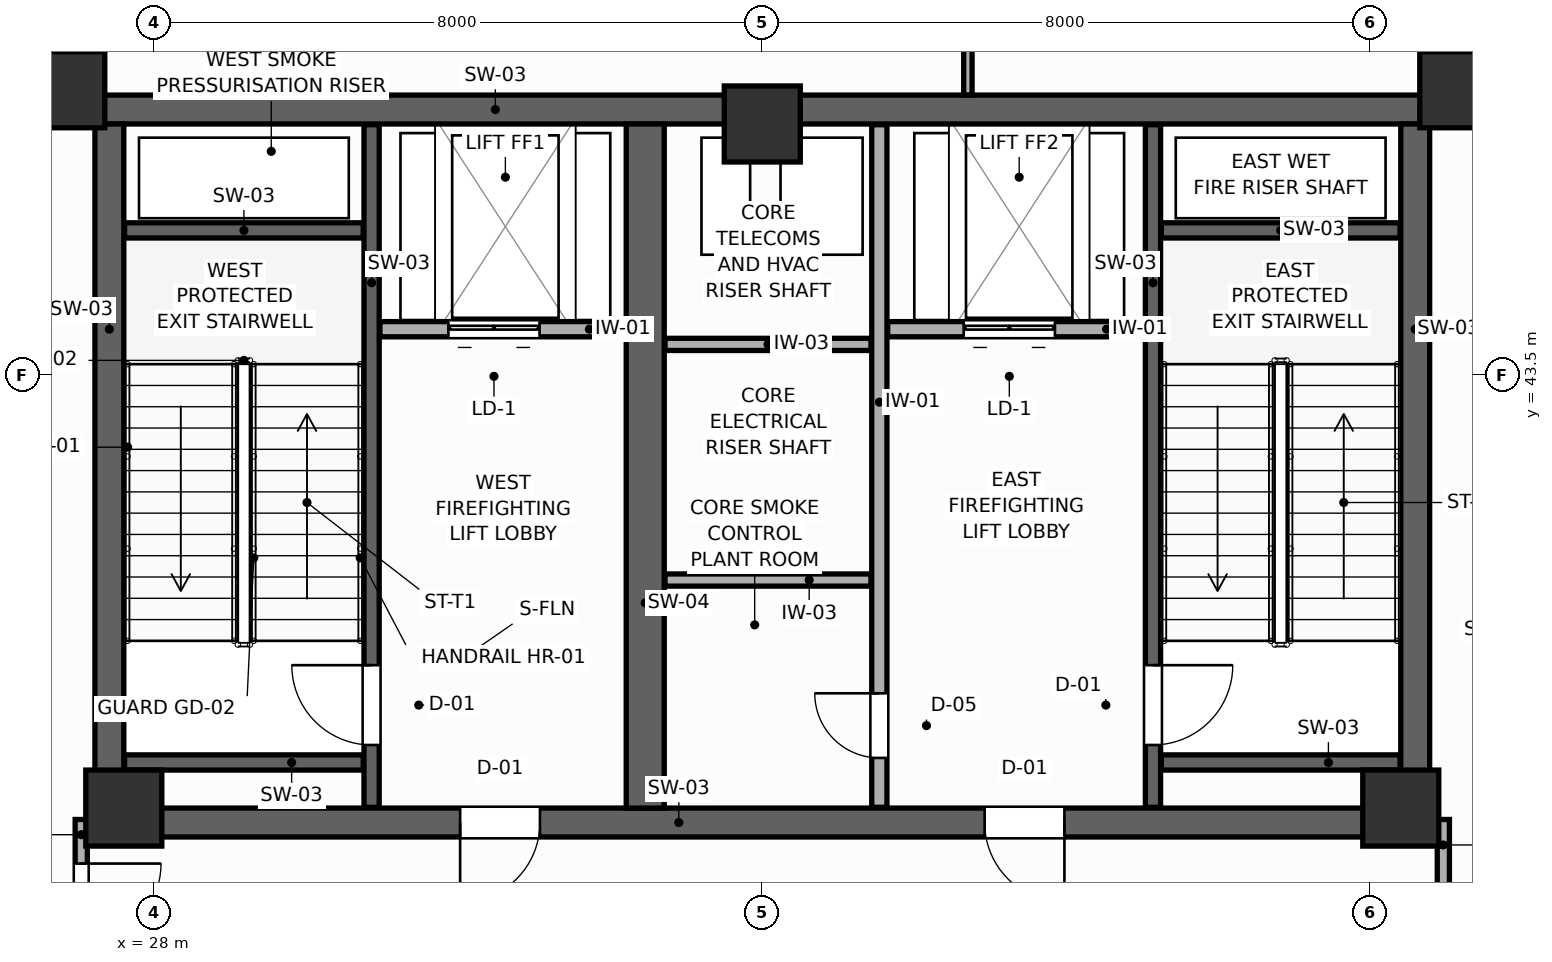
"""IFC4 building model, lengths in metres.
Left out: names, types, materials, properties, quantities, classifications, styles, units other than length and angle.
Written with IfcOpenShell. Run it as: python <this file> out.ifc"""

import sys

from ifc_helpers import new_model, si_unit, direction, frame, frame_2d, origin, origin_2d, place, context, subcontext, project, spatial, rectangle, extrude, source, transform, mapped, element, fill, save


model = new_model("IFC4")
c1 = context("Model", 3, precision=1e-05, world=origin(), true_north=direction((0.0, 1.0)))
c2 = subcontext(c1, "Body", "Model", "MODEL_VIEW")
j1 = project(units=[si_unit("LENGTHUNIT", "METRE"), si_unit("PLANEANGLEUNIT", "RADIAN")], contexts=[c1])
p1 = place(None, origin())
s1 = spatial("IfcSite", under=j1, at=p1, CompositionType="ELEMENT")
p2 = place(p1, origin())
s2 = spatial("IfcBuilding", under=s1, at=p2, CompositionType="ELEMENT")
p3 = place(p2, frame((0.0, 0.0, 238.2)))
s3 = spatial("IfcBuildingStorey", under=s2, at=p3, CompositionType="ELEMENT", Elevation=238.2)
p4 = place(p3, frame((27.22, 46.99, 0.0), z_axis=(0.0, 0.0, 1.0), x_axis=(1.0, 0.0, 0.0)))
e1 = element("IfcWall", 1, at=p4, inside=s3, PredefinedType="SHEAR", context=c2, shape_type="SweptSolid", body=[
    extrude(rectangle(XDim=17.56, YDim=0.38, at=frame_2d((8.78, 0.0))), origin(), (0.0, 0.0, 1.0), 4.8),
])
p5 = place(p3, frame((27.22, 37.61, 0.0), z_axis=(0.0, 0.0, 1.0), x_axis=(1.0, 0.0, 0.0)))
e2 = element("IfcWall", 2, at=p5, inside=s3, PredefinedType="SHEAR", context=c2, shape_type="SweptSolid", body=[
    extrude(rectangle(XDim=17.56, YDim=0.38, at=frame_2d((8.78, 0.0))), origin(), (0.0, 0.0, 1.0), 4.8),
])
p6 = place(p5, frame((4.805, 0.0, 0.0)))
e3 = element("IfcOpeningElement", 3, at=p6, cuts=e2, PredefinedType="OPENING", context=c2, shape_type="SweptSolid", body=[
    extrude(rectangle(XDim=1.05, YDim=2.1, at=frame_2d((0.525, 1.05))), frame((0.0, 0.2, 0.0), z_axis=(0.0, -1.0, 0.0), x_axis=(1.0, 0.0, 0.0)), (0.0, 0.0, 1.0), 0.4),
])
p7 = place(p5, frame((11.705, 0.0, 0.0)))
e4 = element("IfcOpeningElement", 4, at=p7, cuts=e2, PredefinedType="OPENING", context=c2, shape_type="SweptSolid", body=[
    extrude(rectangle(XDim=1.05, YDim=2.1, at=frame_2d((0.525, 1.05))), frame((0.0, 0.2, 0.0), z_axis=(0.0, -1.0, 0.0), x_axis=(1.0, 0.0, 0.0)), (0.0, 0.0, 1.0), 0.4),
])
for number, where, z_axis, x_axis in (
    (5, (27.41, 37.8, 0.0), (0.0, 0.0, 1.0), (0.0, 1.0, 0.0)),
    (6, (44.59, 37.8, 0.0), (0.0, 0.0, 1.0), (0.0, 1.0, 0.0)),
):
    element("IfcWall", number, at=place(p3, frame(where, z_axis=z_axis, x_axis=x_axis)), inside=s3, PredefinedType="SHEAR", context=c2, shape_type="SweptSolid", body=[
        extrude(rectangle(XDim=9.0, YDim=0.38, at=frame_2d((4.5, 0.0))), origin(), (0.0, 0.0, 1.0), 4.8),
    ])
p8 = place(p3, frame((34.46, 37.8, 0.0), z_axis=(0.0, 0.0, 1.0), x_axis=(0.0, 1.0, 0.0)))
e7 = element("IfcWall", 7, at=p8, inside=s3, PredefinedType="SHEAR", context=c2, shape_type="SweptSolid", body=[
    extrude(rectangle(XDim=9.0, YDim=0.5, at=frame_2d((4.5, 0.0))), origin(), (0.0, 0.0, 1.0), 4.61),
])
m1 = source(origin(), c2, "Body", "SweptSolid", [
    extrude(rectangle(XDim=1.0, YDim=1.0, at=origin_2d()), origin(), (0.0, 0.0, 1.0), 4.8),
])
for number, where, z_axis, x_axis in (
    (8, (26.85, 47.25, 0.0), (0.0, 0.0, 1.0), (1.0, 0.0, 0.0)),
    (9, (45.15, 47.25, 0.0), (0.0, 0.0, 1.0), (1.0, 0.0, 0.0)),
    (10, (27.6, 37.8, 0.0), (0.0, 0.0, 1.0), (1.0, 0.0, 0.0)),
    (11, (44.4, 37.8, 0.0), (0.0, 0.0, 1.0), (1.0, 0.0, 0.0)),
    (12, (36.0, 46.8, 0.0), (0.0, 0.0, 1.0), (1.0, 0.0, 0.0)),
):
    element("IfcColumn", number, at=place(p3, frame(where, z_axis=z_axis, x_axis=x_axis)), inside=s3, PredefinedType="COLUMN", context=c2, shape_type="MappedRepresentation", body=[
        mapped(m1, transform((0.0, 0.0, 0.0), scale=1.0)),
    ])
p9 = place(p3, frame((30.86, 37.81, 0.0), z_axis=(0.0, 0.0, 1.0), x_axis=(0.0, 1.0, 0.0)))
e13 = element("IfcWall", 13, at=p9, inside=s3, PredefinedType="SHEAR", context=c2, shape_type="SweptSolid", body=[
    extrude(rectangle(XDim=8.98, YDim=0.2, at=frame_2d((4.49, 0.0))), origin(), (0.0, 0.0, 1.0), 4.8),
])
p10 = place(p9, frame((0.82, 0.0, 0.0)))
e14 = element("IfcOpeningElement", 14, at=p10, cuts=e13, PredefinedType="OPENING", context=c2, shape_type="SweptSolid", body=[
    extrude(rectangle(XDim=1.05, YDim=2.1, at=frame_2d((0.525, 1.05))), frame((0.0, 0.11, 0.0), z_axis=(0.0, -1.0, 0.0), x_axis=(1.0, 0.0, 0.0)), (0.0, 0.0, 1.0), 0.22),
])
for number, where, z_axis, x_axis in (
    (15, (27.61, 45.4, 0.0), (0.0, 0.0, 1.0), (1.0, 0.0, 0.0)),
    (16, (27.61, 38.4, 0.0), (0.0, 0.0, 1.0), (1.0, 0.0, 0.0)),
):
    element("IfcWall", number, at=place(p3, frame(where, z_axis=z_axis, x_axis=x_axis)), inside=s3, PredefinedType="SHEAR", context=c2, shape_type="SweptSolid", body=[
        extrude(rectangle(XDim=3.14, YDim=0.2, at=frame_2d((1.57, 0.0))), origin(), (0.0, 0.0, 1.0), 4.8),
    ])
p11 = place(p3, frame((41.14, 37.81, 0.0), z_axis=(0.0, 0.0, 1.0), x_axis=(0.0, 1.0, 0.0)))
e17 = element("IfcWall", 17, at=p11, inside=s3, PredefinedType="SHEAR", context=c2, shape_type="SweptSolid", body=[
    extrude(rectangle(XDim=8.98, YDim=0.2, at=frame_2d((4.49, 0.0))), origin(), (0.0, 0.0, 1.0), 4.8),
])
p12 = place(p11, frame((0.82, 0.0, 0.0)))
e18 = element("IfcOpeningElement", 18, at=p12, cuts=e17, PredefinedType="OPENING", context=c2, shape_type="SweptSolid", body=[
    extrude(rectangle(XDim=1.05, YDim=2.1, at=frame_2d((0.525, 1.05))), frame((0.0, 0.11, 0.0), z_axis=(0.0, -1.0, 0.0), x_axis=(1.0, 0.0, 0.0)), (0.0, 0.0, 1.0), 0.22),
])
for number, where, z_axis, x_axis in (
    (19, (41.25, 45.4, 0.0), (0.0, 0.0, 1.0), (1.0, 0.0, 0.0)),
    (20, (41.25, 38.4, 0.0), (0.0, 0.0, 1.0), (1.0, 0.0, 0.0)),
):
    element("IfcWall", number, at=place(p3, frame(where, z_axis=z_axis, x_axis=x_axis)), inside=s3, PredefinedType="SHEAR", context=c2, shape_type="SweptSolid", body=[
        extrude(rectangle(XDim=3.14, YDim=0.2, at=frame_2d((1.57, 0.0))), origin(), (0.0, 0.0, 1.0), 4.8),
    ])
p13 = place(p3, frame((30.97, 44.1, 0.0), z_axis=(0.0, 0.0, 1.0), x_axis=(1.0, 0.0, 0.0)))
e21 = element("IfcWall", 21, at=p13, inside=s3, PredefinedType="PARTITIONING", context=c2, shape_type="SweptSolid", body=[
    extrude(rectangle(XDim=3.23, YDim=0.2, at=frame_2d((1.615, 0.0))), origin(), (0.0, 0.0, 1.0), 4.61),
])
p14 = place(p13, frame((0.9, 0.0, 0.0)))
e22 = element("IfcOpeningElement", 22, at=p14, cuts=e21, PredefinedType="OPENING", context=c2, shape_type="SweptSolid", body=[
    extrude(rectangle(XDim=1.2, YDim=2.1, at=frame_2d((0.6, 1.05))), frame((0.0, 0.11, 0.0), z_axis=(0.0, -1.0, 0.0), x_axis=(1.0, 0.0, 0.0)), (0.0, 0.0, 1.0), 0.22),
])
p15 = place(p3, frame((37.65, 44.1, 0.0), z_axis=(0.0, 0.0, 1.0), x_axis=(1.0, 0.0, 0.0)))
e23 = element("IfcWall", 23, at=p15, inside=s3, PredefinedType="PARTITIONING", context=c2, shape_type="SweptSolid", body=[
    extrude(rectangle(XDim=3.38, YDim=0.2, at=frame_2d((1.69, 0.0))), origin(), (0.0, 0.0, 1.0), 4.61),
])
p16 = place(p15, frame((1.0, 0.0, 0.0)))
e24 = element("IfcOpeningElement", 24, at=p16, cuts=e23, PredefinedType="OPENING", context=c2, shape_type="SweptSolid", body=[
    extrude(rectangle(XDim=1.2, YDim=2.1, at=frame_2d((0.6, 1.05))), frame((0.0, 0.11, 0.0), z_axis=(0.0, -1.0, 0.0), x_axis=(1.0, 0.0, 0.0)), (0.0, 0.0, 1.0), 0.22),
])
p17 = place(p3, frame((37.54, 37.81, 0.0), z_axis=(0.0, 0.0, 1.0), x_axis=(0.0, 1.0, 0.0)))
e25 = element("IfcWall", 25, at=p17, inside=s3, PredefinedType="PARTITIONING", context=c2, shape_type="SweptSolid", body=[
    extrude(rectangle(XDim=8.98, YDim=0.2, at=frame_2d((4.49, 0.0))), origin(), (0.0, 0.0, 1.0), 4.61),
])
p18 = place(p17, frame((0.65, 0.0, 0.0)))
e26 = element("IfcOpeningElement", 26, at=p18, cuts=e25, PredefinedType="OPENING", context=c2, shape_type="SweptSolid", body=[
    extrude(rectangle(XDim=0.85, YDim=2.05, at=frame_2d((0.425, 1.025))), frame((0.0, 0.11, 0.0), z_axis=(0.0, -1.0, 0.0), x_axis=(1.0, 0.0, 0.0)), (0.0, 0.0, 1.0), 0.22),
])
for number, where, z_axis, x_axis in (
    (27, (34.72, 40.8, 0.0), (0.0, 0.0, 1.0), (1.0, 0.0, 0.0)),
    (28, (34.72, 43.9, 0.0), (0.0, 0.0, 1.0), (1.0, 0.0, 0.0)),
):
    element("IfcWall", number, at=place(p3, frame(where, z_axis=z_axis, x_axis=x_axis)), inside=s3, PredefinedType="PARTITIONING", context=c2, shape_type="SweptSolid", body=[
        extrude(rectangle(XDim=2.71, YDim=0.16, at=frame_2d((1.355, 0.0))), origin(), (0.0, 0.0, 1.0), 4.61),
    ])
p19 = place(p3, frame((27.04, 35.54, 0.0), z_axis=(0.0, 0.0, 1.0), x_axis=(0.0, 1.0, 0.0)))
e29 = element("IfcWall", 29, at=p19, inside=s3, PredefinedType="PARTITIONING", context=c2, shape_type="SweptSolid", body=[
    extrude(rectangle(XDim=2.11, YDim=0.16, at=frame_2d((1.055, 0.0))), origin(), (0.0, 0.0, 1.0), 4.61),
])
p20 = place(p19, frame((0.48, 0.0, 0.0)))
e30 = element("IfcOpeningElement", 30, at=p20, cuts=e29, PredefinedType="OPENING", context=c2, shape_type="SweptSolid", body=[
    extrude(rectangle(XDim=1.05, YDim=2.1, at=frame_2d((0.525, 1.05))), frame((0.0, 0.09, 0.0), z_axis=(0.0, -1.0, 0.0), x_axis=(1.0, 0.0, 0.0)), (0.0, 0.0, 1.0), 0.18),
])
p21 = place(p3, frame((44.96, 35.0, 0.0), z_axis=(0.0, 0.0, 1.0), x_axis=(0.0, 1.0, 0.0)))
e31 = element("IfcWall", 31, at=p21, inside=s3, PredefinedType="PARTITIONING", context=c2, shape_type="SweptSolid", body=[
    extrude(rectangle(XDim=2.65, YDim=0.16, at=frame_2d((1.325, 0.0))), origin(), (0.0, 0.0, 1.0), 4.61),
])
p22 = place(p21, frame((0.75, 0.0, 0.0)))
e32 = element("IfcOpeningElement", 32, at=p22, cuts=e31, PredefinedType="OPENING", context=c2, shape_type="SweptSolid", body=[
    extrude(rectangle(XDim=1.05, YDim=2.1, at=frame_2d((0.525, 1.05))), frame((0.0, 0.09, 0.0), z_axis=(0.0, -1.0, 0.0), x_axis=(1.0, 0.0, 0.0)), (0.0, 0.0, 1.0), 0.18),
])
p23 = place(p3, frame((45.02, 46.875, 0.0), z_axis=(0.0, 0.0, 1.0), x_axis=(1.0, 0.0, 0.0)))
e33 = element("IfcWall", 33, at=p23, inside=s3, PredefinedType="PARTITIONING", context=c2, shape_type="SweptSolid", body=[
    extrude(rectangle(XDim=2.373, YDim=0.16, at=frame_2d((1.187, 0.0))), origin(), (0.0, 0.0, 1.0), 2.57),
])
p24 = place(p3, frame((38.705, 47.182, 0.0), z_axis=(0.0, 0.0, 1.0), x_axis=(0.0, 1.0, 0.0)))
e34 = element("IfcWall", 34, at=p24, inside=s3, PredefinedType="MOVABLE", context=c2, shape_type="SweptSolid", body=[
    extrude(rectangle(XDim=4.039, YDim=0.11, at=frame_2d((2.02, 0.0))), origin(), (0.0, 0.0, 1.0), 4.61),
])
p25 = place(p10, origin())
e35 = element("IfcDoor", 35, at=p25, inside=s3, OperationType="SINGLE_SWING_RIGHT", PredefinedType="DOOR", context=c2, shape_type="SweptSolid", body=[
    extrude(rectangle(XDim=1.05, YDim=2.1, at=frame_2d((0.525, 1.05))), frame((0.0, 0.025, 0.0), z_axis=(0.0, -1.0, 0.0), x_axis=(1.0, 0.0, 0.0)), (0.0, 0.0, 1.0), 0.05),
])
fill(e14, e35)
p26 = place(p12, frame((1.05, 0.0, 0.0), z_axis=(0.0, 0.0, 1.0), x_axis=(-1.0, 0.0, 0.0)))
e36 = element("IfcDoor", 36, at=p26, inside=s3, OperationType="SINGLE_SWING_LEFT", PredefinedType="DOOR", context=c2, shape_type="SweptSolid", body=[
    extrude(rectangle(XDim=1.05, YDim=2.1, at=frame_2d((0.525, 1.05))), frame((0.0, 0.025, 0.0), z_axis=(0.0, -1.0, 0.0), x_axis=(1.0, 0.0, 0.0)), (0.0, 0.0, 1.0), 0.05),
])
fill(e18, e36)
p27 = place(p14, origin())
e37 = element("IfcDoor", 37, at=p27, inside=s3, OperationType="DOUBLE_DOOR_SLIDING", PredefinedType="DOOR", context=c2, shape_type="SweptSolid", body=[
    extrude(rectangle(XDim=1.2, YDim=2.1, at=frame_2d((0.6, 1.05))), frame((0.0, 0.025, 0.0), z_axis=(0.0, -1.0, 0.0), x_axis=(1.0, 0.0, 0.0)), (0.0, 0.0, 1.0), 0.05),
])
fill(e22, e37)
p28 = place(p16, origin())
e38 = element("IfcDoor", 38, at=p28, inside=s3, OperationType="DOUBLE_DOOR_SLIDING", PredefinedType="DOOR", context=c2, shape_type="SweptSolid", body=[
    extrude(rectangle(XDim=1.2, YDim=2.1, at=frame_2d((0.6, 1.05))), frame((0.0, 0.025, 0.0), z_axis=(0.0, -1.0, 0.0), x_axis=(1.0, 0.0, 0.0)), (0.0, 0.0, 1.0), 0.05),
])
fill(e24, e38)
p29 = place(p18, origin())
e39 = element("IfcDoor", 39, at=p29, inside=s3, OperationType="SINGLE_SWING_RIGHT", PredefinedType="DOOR", context=c2, shape_type="SweptSolid", body=[
    extrude(rectangle(XDim=0.85, YDim=2.05, at=frame_2d((0.425, 1.025))), frame((0.0, 0.025, 0.0), z_axis=(0.0, -1.0, 0.0), x_axis=(1.0, 0.0, 0.0)), (0.0, 0.0, 1.0), 0.05),
])
fill(e26, e39)
p30 = place(p20, frame((1.05, 0.0, 0.0), z_axis=(0.0, 0.0, 1.0), x_axis=(-1.0, 0.0, 0.0)))
e40 = element("IfcDoor", 40, at=p30, inside=s3, OperationType="SINGLE_SWING_LEFT", PredefinedType="DOOR", context=c2, shape_type="SweptSolid", body=[
    extrude(rectangle(XDim=1.05, YDim=2.1, at=frame_2d((0.525, 1.05))), frame((0.0, 0.025, 0.0), z_axis=(0.0, -1.0, 0.0), x_axis=(1.0, 0.0, 0.0)), (0.0, 0.0, 1.0), 0.05),
])
fill(e30, e40)
p31 = place(p6, frame((1.05, 0.0, 0.0), z_axis=(0.0, 0.0, 1.0), x_axis=(-1.0, 0.0, 0.0)))
e41 = element("IfcDoor", 41, at=p31, inside=s3, OperationType="SINGLE_SWING_RIGHT", PredefinedType="DOOR", context=c2, shape_type="SweptSolid", body=[
    extrude(rectangle(XDim=1.05, YDim=2.1, at=frame_2d((0.525, 1.05))), frame((0.0, 0.025, 0.0), z_axis=(0.0, -1.0, 0.0), x_axis=(1.0, 0.0, 0.0)), (0.0, 0.0, 1.0), 0.05),
])
fill(e3, e41)
p32 = place(p7, frame((1.05, 0.0, 0.0), z_axis=(0.0, 0.0, 1.0), x_axis=(-1.0, 0.0, 0.0)))
e42 = element("IfcDoor", 42, at=p32, inside=s3, OperationType="SINGLE_SWING_LEFT", PredefinedType="DOOR", context=c2, shape_type="SweptSolid", body=[
    extrude(rectangle(XDim=1.05, YDim=2.1, at=frame_2d((0.525, 1.05))), frame((0.0, 0.025, 0.0), z_axis=(0.0, -1.0, 0.0), x_axis=(1.0, 0.0, 0.0)), (0.0, 0.0, 1.0), 0.05),
])
fill(e4, e42)
save(model, sys.argv[1])
